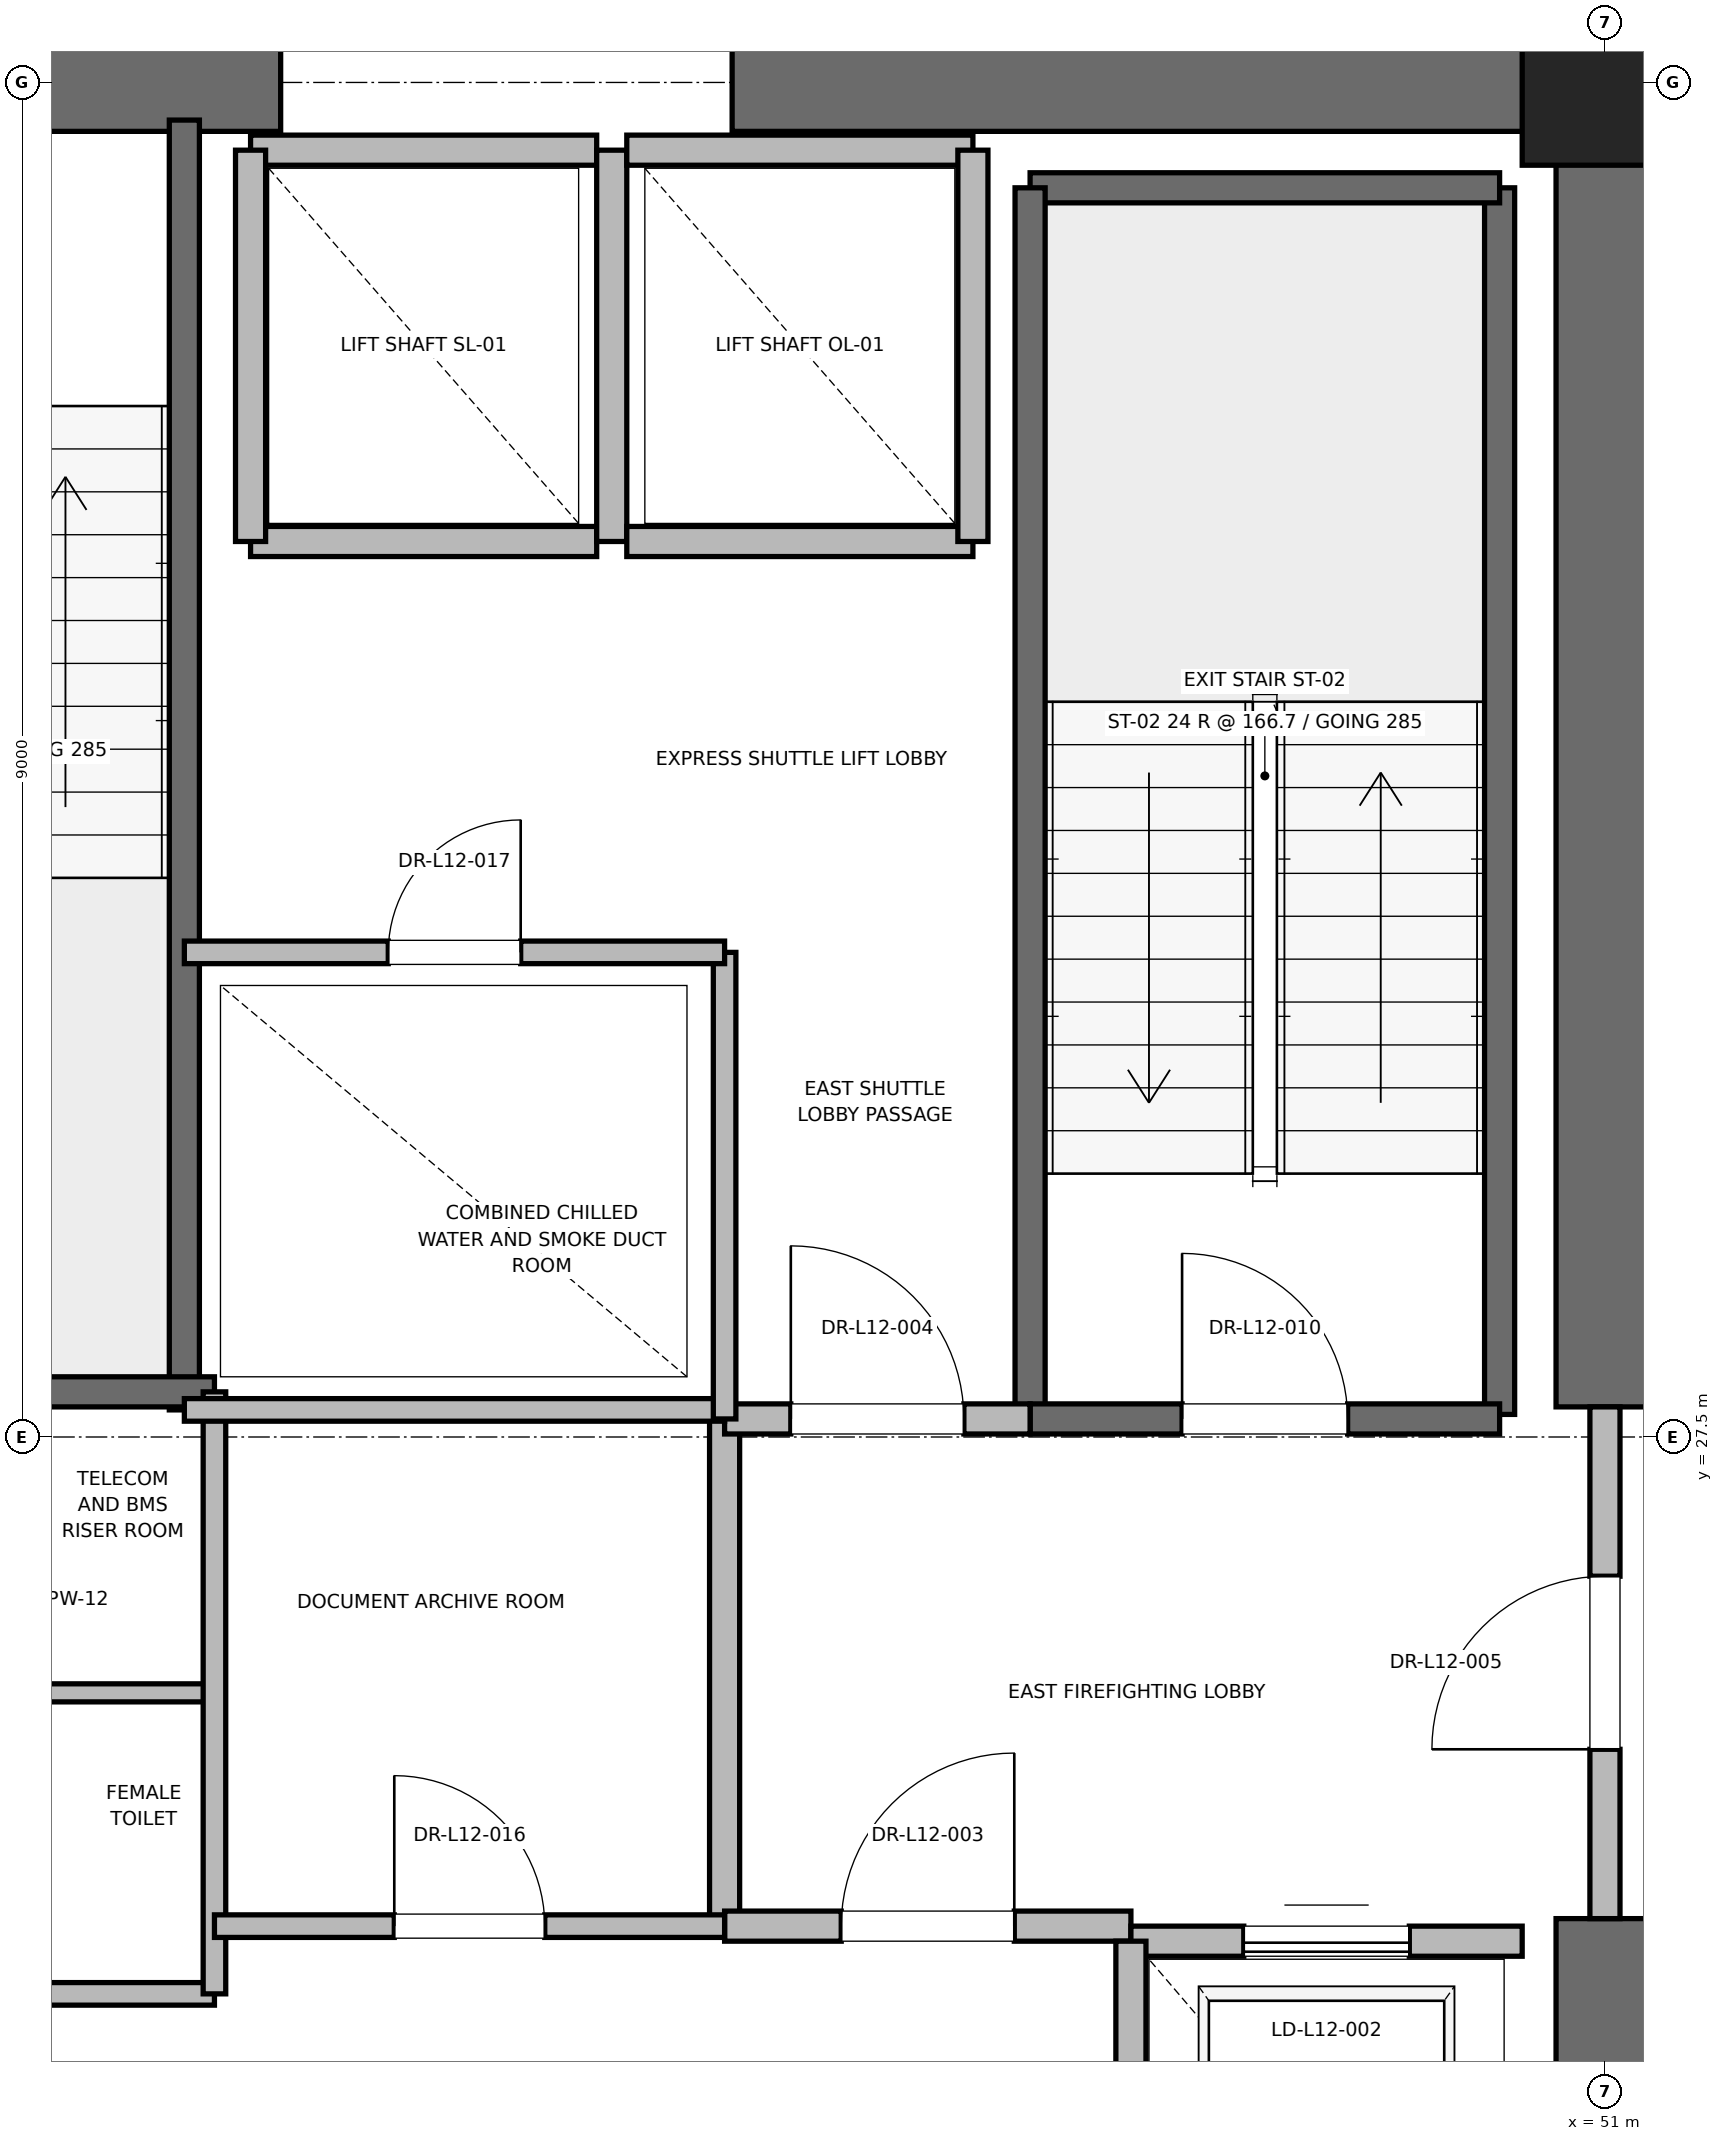
"""IFC4 building model, lengths in metres.
Left out: names, types, materials, properties, quantities, classifications, styles, units other than length and angle.
Written with IfcOpenShell. Run it as: python <this file> out.ifc"""

import sys

from ifc_helpers import new_model, si_unit, direction, frame, frame_2d, origin, origin_2d, place, context, subcontext, project, spatial, rectangle, extrude, element, fill, save


model = new_model("IFC4")
c1 = context("Model", 3, precision=1e-05, world=origin(), true_north=direction((0.0, 1.0)))
c2 = subcontext(c1, "Body", "Model", "MODEL_VIEW")
j1 = project(units=[si_unit("LENGTHUNIT", "METRE"), si_unit("PLANEANGLEUNIT", "RADIAN")], contexts=[c1])
p1 = place(None, origin())
s1 = spatial("IfcSite", under=j1, at=p1, CompositionType="ELEMENT")
p2 = place(p1, origin())
s2 = spatial("IfcBuilding", under=s1, at=p2, CompositionType="ELEMENT")
p3 = place(p2, frame((0.0, 0.0, 55.6)))
s3 = spatial("IfcBuildingStorey", under=s2, at=p3, CompositionType="ELEMENT", Elevation=55.6)
p4 = place(p3, frame((51.0, 36.5, 0.0), z_axis=(0.0, 0.0, 1.0), x_axis=(1.0, 0.0, 0.0)))
e1 = element("IfcColumn", 1, at=p4, inside=s3, PredefinedType="PILASTER", context=c2, shape_type="SweptSolid", body=[
    extrude(rectangle(XDim=1.1, YDim=1.1, at=origin_2d()), origin(), (0.0, 0.0, 1.0), 4.0),
])
p5 = place(p3, frame((37.8, 36.5, 0.0), z_axis=(0.0, 0.0, 1.0), x_axis=(1.0, 0.0, 0.0)))
e2 = element("IfcWall", 2, at=p5, inside=s3, PredefinedType="SHEAR", context=c2, shape_type="SweptSolid", body=[
    extrude(rectangle(XDim=4.4, YDim=0.65, at=frame_2d((2.2, 0.0))), origin(), (0.0, 0.0, 1.0), 3.76),
])
p6 = place(p5, frame((1.65, 0.0, 0.0)))
e3 = element("IfcOpeningElement", 3, at=p6, cuts=e2, PredefinedType="OPENING", context=c2, shape_type="SweptSolid", body=[
    extrude(rectangle(XDim=1.1, YDim=2.15, at=frame_2d((0.55, 1.075))), frame((0.0, 0.325, 0.0), z_axis=(0.0, -1.0, 0.0), x_axis=(1.0, 0.0, 0.0)), (0.0, 0.0, 1.0), 0.65),
])
for number, where, z_axis, x_axis in (
    (4, (45.2, 36.5, 0.0), (0.0, 0.0, 1.0), (1.0, 0.0, 0.0)),
    (5, (51.0, 18.5, 0.0), (0.0, 0.0, 1.0), (0.0, 1.0, 0.0)),
):
    element("IfcWall", number, at=place(p3, frame(where, z_axis=z_axis, x_axis=x_axis)), inside=s3, PredefinedType="SHEAR", context=c2, shape_type="SweptSolid", body=[
        extrude(rectangle(XDim=5.8, YDim=0.65, at=frame_2d((2.9, 0.0))), origin(), (0.0, 0.0, 1.0), 3.76),
    ])
p7 = place(p3, frame((51.0, 27.7, 0.0), z_axis=(0.0, 0.0, 1.0), x_axis=(0.0, 1.0, 0.0)))
e6 = element("IfcWall", 6, at=p7, inside=s3, PredefinedType="SHEAR", context=c2, shape_type="SweptSolid", body=[
    extrude(rectangle(XDim=8.8, YDim=0.65, at=frame_2d((4.4, 0.0))), origin(), (0.0, 0.0, 1.0), 3.76),
])
p8 = place(p3, frame((50.3, 27.65, 0.0), z_axis=(0.0, 0.0, 1.0), x_axis=(0.0, 1.0, 0.0)))
e7 = element("IfcWall", 7, at=p8, inside=s3, PredefinedType="SOLIDWALL", context=c2, shape_type="SweptSolid", body=[
    extrude(rectangle(XDim=8.15, YDim=0.2, at=frame_2d((4.075, 0.0))), origin(), (0.0, 0.0, 1.0), 3.76),
])
p9 = place(p3, frame((47.18, 35.8, 0.0), z_axis=(0.0, 0.0, 1.0), x_axis=(1.0, 0.0, 0.0)))
e8 = element("IfcWall", 8, at=p9, inside=s3, PredefinedType="SOLIDWALL", context=c2, shape_type="SweptSolid", body=[
    extrude(rectangle(XDim=3.12, YDim=0.2, at=frame_2d((1.56, 0.0))), origin(), (0.0, 0.0, 1.0), 3.76),
])
p10 = place(p3, frame((47.18, 27.62, 0.0), z_axis=(0.0, 0.0, 1.0), x_axis=(0.0, 1.0, 0.0)))
e9 = element("IfcWall", 9, at=p10, inside=s3, PredefinedType="SOLIDWALL", context=c2, shape_type="SweptSolid", body=[
    extrude(rectangle(XDim=8.18, YDim=0.2, at=frame_2d((4.09, 0.0))), origin(), (0.0, 0.0, 1.0), 3.76),
])
p11 = place(p3, frame((47.18, 27.62, 0.0), z_axis=(0.0, 0.0, 1.0), x_axis=(1.0, 0.0, 0.0)))
e10 = element("IfcWall", 10, at=p11, inside=s3, PredefinedType="SOLIDWALL", context=c2, shape_type="SweptSolid", body=[
    extrude(rectangle(XDim=3.12, YDim=0.2, at=frame_2d((1.56, 0.0))), origin(), (0.0, 0.0, 1.0), 3.76),
])
p12 = place(p11, frame((1.01, 0.0, 0.0)))
e11 = element("IfcOpeningElement", 11, at=p12, cuts=e10, PredefinedType="OPENING", context=c2, shape_type="SweptSolid", body=[
    extrude(rectangle(XDim=1.1, YDim=2.15, at=frame_2d((0.55, 1.075))), frame((0.0, 0.1, 0.0), z_axis=(0.0, -1.0, 0.0), x_axis=(1.0, 0.0, 0.0)), (0.0, 0.0, 1.0), 0.2),
])
p13 = place(p3, frame((41.56, 27.68, 0.0), z_axis=(0.0, 0.0, 1.0), x_axis=(0.0, 1.0, 0.0)))
e12 = element("IfcWall", 12, at=p13, inside=s3, PredefinedType="SOLIDWALL", context=c2, shape_type="SweptSolid", body=[
    extrude(rectangle(XDim=8.57, YDim=0.2, at=frame_2d((4.285, 0.0))), origin(), (0.0, 0.0, 1.0), 3.76),
])
p14 = place(p3, frame((38.44, 27.8, 0.0), z_axis=(0.0, 0.0, 1.0), x_axis=(1.0, 0.0, 0.0)))
e13 = element("IfcWall", 13, at=p14, inside=s3, PredefinedType="SOLIDWALL", context=c2, shape_type="SweptSolid", body=[
    extrude(rectangle(XDim=3.32, YDim=0.2, at=frame_2d((1.66, 0.0))), origin(), (0.0, 0.0, 1.0), 3.76),
])
p15 = place(p3, frame((45.15, 24.25, 0.0), z_axis=(0.0, 0.0, 1.0), x_axis=(0.0, 1.0, 0.0)))
e14 = element("IfcWall", 14, at=p15, inside=s3, PredefinedType="PARTITIONING", context=c2, shape_type="SweptSolid", body=[
    extrude(rectangle(XDim=3.37, YDim=0.2, at=frame_2d((1.685, 0.0))), origin(), (0.0, 0.0, 1.0), 3.76),
])
p16 = place(p3, frame((45.15, 24.25, 0.0), z_axis=(0.0, 0.0, 1.0), x_axis=(1.0, 0.0, 0.0)))
e15 = element("IfcWall", 15, at=p16, inside=s3, PredefinedType="PARTITIONING", context=c2, shape_type="SweptSolid", body=[
    extrude(rectangle(XDim=2.7, YDim=0.2, at=frame_2d((1.35, 0.0))), origin(), (0.0, 0.0, 1.0), 3.76),
])
p17 = place(p16, frame((0.775, 0.0, 0.0)))
e16 = element("IfcOpeningElement", 16, at=p17, cuts=e15, PredefinedType="OPENING", context=c2, shape_type="SweptSolid", body=[
    extrude(rectangle(XDim=1.15, YDim=2.2, at=frame_2d((0.575, 1.1))), frame((0.0, 0.1, 0.0), z_axis=(0.0, -1.0, 0.0), x_axis=(1.0, 0.0, 0.0)), (0.0, 0.0, 1.0), 0.2),
])
p18 = place(p3, frame((45.15, 27.62, 0.0), z_axis=(0.0, 0.0, 1.0), x_axis=(1.0, 0.0, 0.0)))
e17 = element("IfcWall", 17, at=p18, inside=s3, PredefinedType="PARTITIONING", context=c2, shape_type="SweptSolid", body=[
    extrude(rectangle(XDim=2.03, YDim=0.2, at=frame_2d((1.015, 0.0))), origin(), (0.0, 0.0, 1.0), 3.76),
])
p19 = place(p18, frame((0.44, 0.0, 0.0)))
e18 = element("IfcOpeningElement", 18, at=p19, cuts=e17, PredefinedType="OPENING", context=c2, shape_type="SweptSolid", body=[
    extrude(rectangle(XDim=1.15, YDim=2.2, at=frame_2d((0.575, 1.1))), frame((0.0, 0.1, 0.0), z_axis=(0.0, -1.0, 0.0), x_axis=(1.0, 0.0, 0.0)), (0.0, 0.0, 1.0), 0.2),
])
p20 = place(p3, frame((51.0, 24.3, 0.0), z_axis=(0.0, 0.0, 1.0), x_axis=(0.0, 1.0, 0.0)))
e19 = element("IfcWall", 19, at=p20, inside=s3, PredefinedType="PARTITIONING", context=c2, shape_type="SweptSolid", body=[
    extrude(rectangle(XDim=3.4, YDim=0.2, at=frame_2d((1.7, 0.0))), origin(), (0.0, 0.0, 1.0), 2.54),
])
p21 = place(p20, frame((1.125, 0.0, 0.0)))
e20 = element("IfcOpeningElement", 20, at=p21, cuts=e19, PredefinedType="OPENING", context=c2, shape_type="SweptSolid", body=[
    extrude(rectangle(XDim=1.15, YDim=2.2, at=frame_2d((0.575, 1.1))), frame((0.0, 0.1, 0.0), z_axis=(0.0, -1.0, 0.0), x_axis=(1.0, 0.0, 0.0)), (0.0, 0.0, 1.0), 0.2),
])
p22 = place(p3, frame((50.45, 24.15, 0.0), z_axis=(0.0, 0.0, 1.0), x_axis=(-1.0, 0.0, 0.0)))
e21 = element("IfcWall", 21, at=p22, inside=s3, PredefinedType="SOLIDWALL", context=c2, shape_type="SweptSolid", body=[
    extrude(rectangle(XDim=2.6, YDim=0.2, at=frame_2d((1.3, 0.0))), origin(), (0.0, 0.0, 1.0), 2.54),
])
p23 = place(p22, frame((0.75, 0.0, 0.0)))
e22 = element("IfcOpeningElement", 22, at=p23, cuts=e21, PredefinedType="OPENING", context=c2, shape_type="SweptSolid", body=[
    extrude(rectangle(XDim=1.1, YDim=2.2, at=frame_2d((0.55, 1.1))), frame((0.0, 0.1, 0.0), z_axis=(0.0, -1.0, 0.0), x_axis=(1.0, 0.0, 0.0)), (0.0, 0.0, 1.0), 0.2),
])
p24 = place(p3, frame((47.85, 24.15, 0.0), z_axis=(0.0, 0.0, 1.0), x_axis=(0.0, -1.0, 0.0)))
e23 = element("IfcWall", 23, at=p24, inside=s3, PredefinedType="SOLIDWALL", context=c2, shape_type="SweptSolid", body=[
    extrude(rectangle(XDim=3.0, YDim=0.2, at=frame_2d((1.5, 0.0))), origin(), (0.0, 0.0, 1.0), 3.76),
])
p25 = place(p3, frame((42.0, 33.45, 0.0), z_axis=(0.0, 0.0, 1.0), x_axis=(1.0, 0.0, 0.0)))
e24 = element("IfcWall", 24, at=p25, inside=s3, PredefinedType="SOLIDWALL", context=c2, shape_type="SweptSolid", body=[
    extrude(rectangle(XDim=2.3, YDim=0.2, at=frame_2d((1.15, 0.0))), origin(), (0.0, 0.0, 1.0), 3.76),
])
p26 = place(p3, frame((44.3, 36.05, 0.0), z_axis=(0.0, 0.0, 1.0), x_axis=(-1.0, 0.0, 0.0)))
e25 = element("IfcWall", 25, at=p26, inside=s3, PredefinedType="SOLIDWALL", context=c2, shape_type="SweptSolid", body=[
    extrude(rectangle(XDim=2.3, YDim=0.2, at=frame_2d((1.15, 0.0))), origin(), (0.0, 0.0, 1.0), 2.54),
])
for number, where, z_axis, x_axis in (
    (26, (42.0, 36.05, 0.0), (0.0, 0.0, 1.0), (0.0, -1.0, 0.0)),
    (27, (44.4, 33.45, 0.0), (0.0, 0.0, 1.0), (0.0, 1.0, 0.0)),
):
    element("IfcWall", number, at=place(p3, frame(where, z_axis=z_axis, x_axis=x_axis)), inside=s3, PredefinedType="SOLIDWALL", context=c2, shape_type="SweptSolid", body=[
        extrude(rectangle(XDim=2.6, YDim=0.2, at=frame_2d((1.3, 0.0))), origin(), (0.0, 0.0, 1.0), 2.54),
    ])
p27 = place(p3, frame((44.5, 33.45, 0.0), z_axis=(0.0, 0.0, 1.0), x_axis=(1.0, 0.0, 0.0)))
e28 = element("IfcWall", 28, at=p27, inside=s3, PredefinedType="SOLIDWALL", context=c2, shape_type="SweptSolid", body=[
    extrude(rectangle(XDim=2.3, YDim=0.2, at=frame_2d((1.15, 0.0))), origin(), (0.0, 0.0, 1.0), 3.76),
])
p28 = place(p3, frame((46.8, 36.05, 0.0), z_axis=(0.0, 0.0, 1.0), x_axis=(-1.0, 0.0, 0.0)))
e29 = element("IfcWall", 29, at=p28, inside=s3, PredefinedType="SOLIDWALL", context=c2, shape_type="SweptSolid", body=[
    extrude(rectangle(XDim=2.3, YDim=0.2, at=frame_2d((1.15, 0.0))), origin(), (0.0, 0.0, 1.0), 2.54),
])
p29 = place(p3, frame((46.8, 33.45, 0.0), z_axis=(0.0, 0.0, 1.0), x_axis=(0.0, 1.0, 0.0)))
e30 = element("IfcWall", 30, at=p29, inside=s3, PredefinedType="SOLIDWALL", context=c2, shape_type="SweptSolid", body=[
    extrude(rectangle(XDim=2.6, YDim=0.2, at=frame_2d((1.3, 0.0))), origin(), (0.0, 0.0, 1.0), 3.76),
])
p30 = place(p3, frame((39.95, 23.8, 0.0), z_axis=(0.0, 0.0, 1.0), x_axis=(1.0, 0.0, 0.0)))
e31 = element("IfcWall", 31, at=p30, inside=s3, PredefinedType="PARTITIONING", context=c2, shape_type="SweptSolid", body=[
    extrude(rectangle(XDim=1.81, YDim=0.15, at=frame_2d((0.905, 0.0))), origin(), (0.0, 0.0, 1.0), 2.85),
])
p31 = place(p3, frame((39.95, 25.8, 0.0), z_axis=(0.0, 0.0, 1.0), x_axis=(1.0, 0.0, 0.0)))
e32 = element("IfcWall", 32, at=p31, inside=s3, PredefinedType="PARTITIONING", context=c2, shape_type="SweptSolid", body=[
    extrude(rectangle(XDim=1.81, YDim=0.12, at=frame_2d((0.905, 0.0))), origin(), (0.0, 0.0, 1.0), 2.85),
])
p32 = place(p3, frame((41.76, 23.8, 0.0), z_axis=(0.0, 0.0, 1.0), x_axis=(0.0, 1.0, 0.0)))
e33 = element("IfcWall", 33, at=p32, inside=s3, PredefinedType="PARTITIONING", context=c2, shape_type="SweptSolid", body=[
    extrude(rectangle(XDim=4.0, YDim=0.15, at=frame_2d((2.0, 0.0))), origin(), (0.0, 0.0, 1.0), 2.85),
])
p33 = place(p3, frame((41.56, 27.68, 0.0), z_axis=(0.0, 0.0, 1.0), x_axis=(1.0, 0.0, 0.0)))
e34 = element("IfcWall", 34, at=p33, inside=s3, PredefinedType="PARTITIONING", context=c2, shape_type="SweptSolid", body=[
    extrude(rectangle(XDim=3.59, YDim=0.15, at=frame_2d((1.795, 0.0))), origin(), (0.0, 0.0, 1.0), 2.85),
])
p34 = place(p3, frame((41.76, 24.25, 0.0), z_axis=(0.0, 0.0, 1.0), x_axis=(1.0, 0.0, 0.0)))
e35 = element("IfcWall", 35, at=p34, inside=s3, PredefinedType="PARTITIONING", context=c2, shape_type="SweptSolid", body=[
    extrude(rectangle(XDim=3.39, YDim=0.15, at=frame_2d((1.695, 0.0))), origin(), (0.0, 0.0, 1.0), 2.85),
])
p35 = place(p34, frame((1.195, 0.0, 0.0)))
e36 = element("IfcOpeningElement", 36, at=p35, cuts=e35, PredefinedType="OPENING", context=c2, shape_type="SweptSolid", body=[
    extrude(rectangle(XDim=1.0, YDim=2.15, at=frame_2d((0.5, 1.075))), frame((0.0, 0.075, 0.0), z_axis=(0.0, -1.0, 0.0), x_axis=(1.0, 0.0, 0.0)), (0.0, 0.0, 1.0), 0.15),
])
p36 = place(p3, frame((45.15, 27.62, 0.0), z_axis=(0.0, 0.0, 1.0), x_axis=(0.0, 1.0, 0.0)))
e37 = element("IfcWall", 37, at=p36, inside=s3, PredefinedType="PARTITIONING", context=c2, shape_type="SweptSolid", body=[
    extrude(rectangle(XDim=3.1, YDim=0.15, at=frame_2d((1.55, 0.0))), origin(), (0.0, 0.0, 1.0), 2.85),
])
p37 = place(p3, frame((41.56, 30.72, 0.0), z_axis=(0.0, 0.0, 1.0), x_axis=(1.0, 0.0, 0.0)))
e38 = element("IfcWall", 38, at=p37, inside=s3, PredefinedType="PARTITIONING", context=c2, shape_type="SweptSolid", body=[
    extrude(rectangle(XDim=3.59, YDim=0.15, at=frame_2d((1.795, 0.0))), origin(), (0.0, 0.0, 1.0), 2.85),
])
p38 = place(p37, frame((1.355, 0.0, 0.0)))
e39 = element("IfcOpeningElement", 39, at=p38, cuts=e38, PredefinedType="OPENING", context=c2, shape_type="SweptSolid", body=[
    extrude(rectangle(XDim=0.88, YDim=2.1, at=frame_2d((0.44, 1.05))), frame((0.0, 0.075, 0.0), z_axis=(0.0, -1.0, 0.0), x_axis=(1.0, 0.0, 0.0)), (0.0, 0.0, 1.0), 0.15),
])
p39 = place(p12, origin())
e40 = element("IfcDoor", 40, at=p39, inside=s3, OperationType="SINGLE_SWING_LEFT", PredefinedType="DOOR", context=c2, shape_type="SweptSolid", body=[
    extrude(rectangle(XDim=1.1, YDim=2.15, at=frame_2d((0.55, 1.075))), frame((0.0, 0.025, 0.0), z_axis=(0.0, -1.0, 0.0), x_axis=(1.0, 0.0, 0.0)), (0.0, 0.0, 1.0), 0.05),
])
fill(e11, e40)
p40 = place(p17, origin())
e41 = element("IfcDoor", 41, at=p40, inside=s3, OperationType="SINGLE_SWING_RIGHT", PredefinedType="DOOR", context=c2, shape_type="SweptSolid", body=[
    extrude(rectangle(XDim=1.15, YDim=2.2, at=frame_2d((0.575, 1.1))), frame((0.0, 0.025, 0.0), z_axis=(0.0, -1.0, 0.0), x_axis=(1.0, 0.0, 0.0)), (0.0, 0.0, 1.0), 0.05),
])
fill(e16, e41)
p41 = place(p19, origin())
e42 = element("IfcDoor", 42, at=p41, inside=s3, OperationType="SINGLE_SWING_LEFT", PredefinedType="DOOR", context=c2, shape_type="SweptSolid", body=[
    extrude(rectangle(XDim=1.15, YDim=2.2, at=frame_2d((0.575, 1.1))), frame((0.0, 0.025, 0.0), z_axis=(0.0, -1.0, 0.0), x_axis=(1.0, 0.0, 0.0)), (0.0, 0.0, 1.0), 0.05),
])
fill(e18, e42)
p42 = place(p21, origin())
e43 = element("IfcDoor", 43, at=p42, inside=s3, OperationType="SINGLE_SWING_LEFT", PredefinedType="DOOR", context=c2, shape_type="SweptSolid", body=[
    extrude(rectangle(XDim=1.15, YDim=2.2, at=frame_2d((0.575, 1.1))), frame((0.0, 0.025, 0.0), z_axis=(0.0, -1.0, 0.0), x_axis=(1.0, 0.0, 0.0)), (0.0, 0.0, 1.0), 0.05),
])
fill(e20, e43)
p43 = place(p23, origin())
e44 = element("IfcDoor", 44, at=p43, inside=s3, OperationType="SLIDING_TO_RIGHT", PredefinedType="DOOR", context=c2, shape_type="SweptSolid", body=[
    extrude(rectangle(XDim=1.1, YDim=2.2, at=frame_2d((0.55, 1.1))), frame((0.0, 0.025, 0.0), z_axis=(0.0, -1.0, 0.0), x_axis=(1.0, 0.0, 0.0)), (0.0, 0.0, 1.0), 0.05),
])
fill(e22, e44)
p44 = place(p35, origin())
e45 = element("IfcDoor", 45, at=p44, inside=s3, OperationType="SINGLE_SWING_LEFT", PredefinedType="DOOR", context=c2, shape_type="SweptSolid", body=[
    extrude(rectangle(XDim=1.0, YDim=2.15, at=frame_2d((0.5, 1.075))), frame((0.0, 0.025, 0.0), z_axis=(0.0, -1.0, 0.0), x_axis=(1.0, 0.0, 0.0)), (0.0, 0.0, 1.0), 0.05),
])
fill(e36, e45)
p45 = place(p38, origin())
e46 = element("IfcDoor", 46, at=p45, inside=s3, OperationType="SINGLE_SWING_RIGHT", PredefinedType="DOOR", context=c2, shape_type="SweptSolid", body=[
    extrude(rectangle(XDim=0.88, YDim=2.1, at=frame_2d((0.44, 1.05))), frame((0.0, 0.025, 0.0), z_axis=(0.0, -1.0, 0.0), x_axis=(1.0, 0.0, 0.0)), (0.0, 0.0, 1.0), 0.05),
])
fill(e39, e46)
save(model, sys.argv[1])
